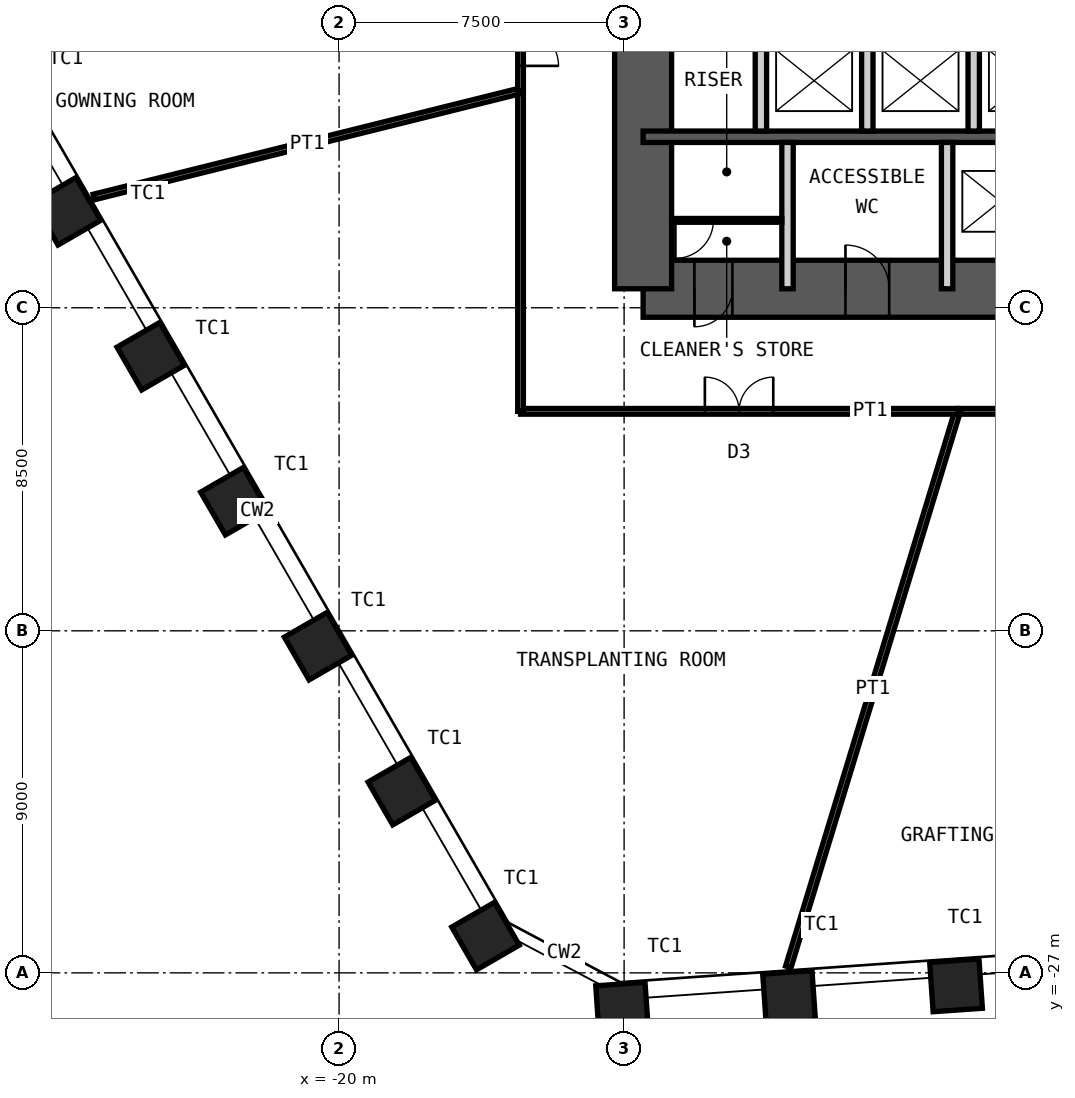
"""IFC4 building model, lengths in metres.
Left out: names, types, materials, properties, quantities, classifications, styles, units other than length and angle.
Written with IfcOpenShell. Run it as: python <this file> out.ifc"""

import sys

from ifc_helpers import new_model, si_unit, direction, frame, frame_2d, origin, origin_2d, place, context, subcontext, project, spatial, rectangle, hollow_rectangle, extrude, element, fill, save


model = new_model("IFC4")
c1 = context("Model", 3, precision=1e-05, world=origin(), true_north=direction((0.0, 1.0)))
c2 = subcontext(c1, "Body", "Model", "MODEL_VIEW")
j1 = project(units=[si_unit("LENGTHUNIT", "METRE"), si_unit("PLANEANGLEUNIT", "RADIAN")], contexts=[c1])
p1 = place(None, origin())
s1 = spatial("IfcSite", under=j1, at=p1, CompositionType="ELEMENT")
p2 = place(p1, origin())
s2 = spatial("IfcBuilding", under=s1, at=p2, CompositionType="ELEMENT")
p3 = place(p2, frame((0.0, 0.0, 32.0)))
s3 = spatial("IfcBuildingStorey", under=s2, at=p3, CompositionType="ELEMENT", Elevation=32.0)
for number, where, z_axis, x_axis in (
    (1, (-3.765, -27.329, 0.0), (0.0, 0.0, 1.0), (0.998, 0.07, 0.0)),
    (2, (-8.159, -27.636, 0.0), (0.0, 0.0, 1.0), (0.998, 0.07, 0.0)),
    (3, (-12.553, -27.944, 0.0), (0.0, 0.0, 1.0), (0.998, 0.07, 0.0)),
    (4, (-16.147, -26.033, 0.0), (0.0, 0.0, 1.0), (0.5, -0.866, 0.0)),
    (5, (-18.349, -22.218, 0.0), (0.0, 0.0, 1.0), (0.5, -0.866, 0.0)),
    (6, (-20.552, -18.404, 0.0), (0.0, 0.0, 1.0), (0.5, -0.866, 0.0)),
    (7, (-22.754, -14.589, 0.0), (0.0, 0.0, 1.0), (0.5, -0.866, 0.0)),
    (8, (-24.956, -10.775, 0.0), (0.0, 0.0, 1.0), (0.5, -0.866, 0.0)),
    (9, (-27.158, -6.96, 0.0), (0.0, 0.0, 1.0), (0.5, -0.866, 0.0)),
):
    element("IfcColumn", number, at=place(p3, frame(where, z_axis=z_axis, x_axis=x_axis)), inside=s3, PredefinedType="COLUMN", context=c2, shape_type="SweptSolid", body=[
        extrude(hollow_rectangle(XDim=1.3, YDim=1.3, WallThickness=0.1, at=origin_2d()), origin(), (0.0, 0.0, 1.0), 5.0),
    ])
p4 = place(p3, frame((-12.0, -9.0, 0.0), z_axis=(0.0, 0.0, 1.0), x_axis=(1.0, 0.0, 0.0)))
e10 = element("IfcWall", 10, at=p4, inside=s3, PredefinedType="SHEAR", context=c2, shape_type="SweptSolid", body=[
    extrude(rectangle(XDim=24.0, YDim=1.5, at=frame_2d((12.0, 0.0))), origin(), (0.0, 0.0, 1.0), 5.0),
])
p5 = place(p4, frame((1.35, 0.0, 0.0)))
e11 = element("IfcOpeningElement", 11, at=p5, cuts=e10, PredefinedType="OPENING", context=c2, shape_type="SweptSolid", body=[
    extrude(rectangle(XDim=1.0, YDim=2.1, at=frame_2d((0.5, 1.05))), frame((0.0, 0.76, 0.0), z_axis=(0.0, -1.0, 0.0), x_axis=(1.0, 0.0, 0.0)), (0.0, 0.0, 1.0), 1.52),
])
p6 = place(p4, frame((5.325, 0.0, 0.0)))
e12 = element("IfcOpeningElement", 12, at=p6, cuts=e10, PredefinedType="OPENING", context=c2, shape_type="SweptSolid", body=[
    extrude(rectangle(XDim=1.15, YDim=2.1, at=frame_2d((0.575, 1.05))), frame((0.0, 0.76, 0.0), z_axis=(0.0, -1.0, 0.0), x_axis=(1.0, 0.0, 0.0)), (0.0, 0.0, 1.0), 1.52),
])
p7 = place(p4, frame((12.6, 0.0, 0.0)))
e13 = element("IfcOpeningElement", 13, at=p7, cuts=e10, PredefinedType="OPENING", context=c2, shape_type="SweptSolid", body=[
    extrude(rectangle(XDim=1.0, YDim=2.1, at=frame_2d((0.5, 1.05))), frame((0.0, 0.76, 0.0), z_axis=(0.0, -1.0, 0.0), x_axis=(1.0, 0.0, 0.0)), (0.0, 0.0, 1.0), 1.52),
])
p8 = place(p3, frame((-12.0, -9.0, 0.0), z_axis=(0.0, 0.0, 1.0), x_axis=(0.0, 1.0, 0.0)))
e14 = element("IfcWall", 14, at=p8, inside=s3, PredefinedType="SHEAR", context=c2, shape_type="SweptSolid", body=[
    extrude(rectangle(XDim=18.0, YDim=1.5, at=frame_2d((9.0, 0.0))), origin(), (0.0, 0.0, 1.0), 5.0),
])
p9 = place(p8, frame((8.1, 0.0, 0.0)))
e15 = element("IfcOpeningElement", 15, at=p9, cuts=e14, PredefinedType="OPENING", context=c2, shape_type="SweptSolid", body=[
    extrude(rectangle(XDim=1.8, YDim=2.1, at=frame_2d((0.9, 1.05))), frame((0.0, 0.76, 0.0), z_axis=(0.0, -1.0, 0.0), x_axis=(1.0, 0.0, 0.0)), (0.0, 0.0, 1.0), 1.52),
])
p10 = place(p3, frame((-12.0, -5.0, 0.0), z_axis=(0.0, 0.0, 1.0), x_axis=(1.0, 0.0, 0.0)))
e16 = element("IfcWall", 16, at=p10, inside=s3, PredefinedType="SHEAR", context=c2, shape_type="SweptSolid", body=[
    extrude(rectangle(XDim=24.0, YDim=0.3, at=frame_2d((12.0, 0.0))), origin(), (0.0, 0.0, 1.0), 5.0),
])
for number, where, z_axis, x_axis in (
    (17, (-8.9, -4.85, 0.0), (0.0, 0.0, 1.0), (0.0, 1.0, 0.0)),
    (18, (-6.1, -4.85, 0.0), (0.0, 0.0, 1.0), (0.0, 1.0, 0.0)),
    (19, (-3.3, -4.85, 0.0), (0.0, 0.0, 1.0), (0.0, 1.0, 0.0)),
):
    element("IfcWall", number, at=place(p3, frame(where, z_axis=z_axis, x_axis=x_axis)), inside=s3, PredefinedType="PARTITIONING", context=c2, shape_type="SweptSolid", body=[
        extrude(rectangle(XDim=2.65, YDim=0.3, at=frame_2d((1.325, 0.0))), origin(), (0.0, 0.0, 1.0), 4.78),
    ])
for number, where, z_axis, x_axis in (
    (20, (-8.2, -9.0, 0.0), (0.0, 0.0, 1.0), (0.0, 1.0, 0.0)),
    (21, (-4.0, -9.0, 0.0), (0.0, 0.0, 1.0), (0.0, 1.0, 0.0)),
):
    element("IfcWall", number, at=place(p3, frame(where, z_axis=z_axis, x_axis=x_axis)), inside=s3, PredefinedType="PARTITIONING", context=c2, shape_type="SweptSolid", body=[
        extrude(rectangle(XDim=3.85, YDim=0.3, at=frame_2d((1.925, 0.0))), origin(), (0.0, 0.0, 1.0), 4.78),
    ])
p11 = place(p3, frame((-11.25, -7.2, 0.0), z_axis=(0.0, 0.0, 1.0), x_axis=(1.0, 0.0, 0.0)))
e22 = element("IfcWall", 22, at=p11, inside=s3, PredefinedType="PARTITIONING", context=c2, shape_type="SweptSolid", body=[
    extrude(rectangle(XDim=2.9, YDim=0.1, at=frame_2d((1.45, 0.0))), origin(), (0.0, 0.0, 1.0), 4.78),
])
p12 = place(p11, frame((0.1, 0.0, 0.0)))
e23 = element("IfcOpeningElement", 23, at=p12, cuts=e22, PredefinedType="OPENING", context=c2, shape_type="SweptSolid", body=[
    extrude(rectangle(XDim=1.0, YDim=2.4, at=frame_2d((0.5, 1.2))), frame((0.0, 0.06, 0.0), z_axis=(0.0, -1.0, 0.0), x_axis=(1.0, 0.0, 0.0)), (0.0, 0.0, 1.0), 0.12),
])
p13 = place(p3, frame((0.269, -12.225, 0.0), z_axis=(0.0, 0.0, 1.0), x_axis=(-1.0, 0.0, 0.0)))
e24 = element("IfcWall", 24, at=p13, inside=s3, PredefinedType="PARTITIONING", context=c2, shape_type="SweptSolid", body=[
    extrude(rectangle(XDim=3.994, YDim=0.15, at=frame_2d((1.997, 0.0))), origin(), (0.0, 0.0, 1.0), 4.8),
])
p14 = place(p13, frame((1.497, 0.0, 0.0)))
e25 = element("IfcOpeningElement", 25, at=p14, cuts=e24, PredefinedType="OPENING", context=c2, shape_type="SweptSolid", body=[
    extrude(rectangle(XDim=1.0, YDim=2.4, at=frame_2d((0.5, 1.2))), frame((0.0, 0.085, 0.0), z_axis=(0.0, -1.0, 0.0), x_axis=(1.0, 0.0, 0.0)), (0.0, 0.0, 1.0), 0.17),
])
p15 = place(p3, frame((-8.179, -26.843, 0.0), z_axis=(0.0, 0.0, 1.0), x_axis=(0.291465492753, 0.956581343397, 0.0)))
e26 = element("IfcWall", 26, at=p15, inside=s3, PredefinedType="PARTITIONING", context=c2, shape_type="SweptSolid", body=[
    extrude(rectangle(XDim=15.281, YDim=0.15, at=frame_2d((7.641, 0.0))), origin(), (0.0, 0.0, 1.0), 3.7),
])
p16 = place(p3, frame((-3.725, -12.225, 0.0), z_axis=(0.0, 0.0, 1.0), x_axis=(-1.0, 0.0, 0.0)))
e27 = element("IfcWall", 27, at=p16, inside=s3, PredefinedType="PARTITIONING", context=c2, shape_type="SweptSolid", body=[
    extrude(rectangle(XDim=11.5, YDim=0.15, at=frame_2d((5.75, 0.0))), origin(), (0.0, 0.0, 1.0), 4.8),
])
p17 = place(p16, frame((4.85, 0.0, 0.0)))
e28 = element("IfcOpeningElement", 28, at=p17, cuts=e27, PredefinedType="OPENING", context=c2, shape_type="SweptSolid", body=[
    extrude(rectangle(XDim=1.8, YDim=2.4, at=frame_2d((0.9, 1.2))), frame((0.0, 0.085, 0.0), z_axis=(0.0, -1.0, 0.0), x_axis=(1.0, 0.0, 0.0)), (0.0, 0.0, 1.0), 0.17),
])
p18 = place(p3, frame((-15.225, -12.225, 0.0), z_axis=(0.0, 0.0, 1.0), x_axis=(0.0, 1.0, 0.0)))
e29 = element("IfcWall", 29, at=p18, inside=s3, PredefinedType="PARTITIONING", context=c2, shape_type="SweptSolid", body=[
    extrude(rectangle(XDim=8.435, YDim=0.15, at=frame_2d((4.217, 0.0))), origin(), (0.0, 0.0, 1.0), 4.8),
])
p19 = place(p3, frame((-26.455, -6.586, 0.0), z_axis=(0.0, 0.0, 1.0), x_axis=(0.970383998101, 0.241567581083, 0.0)))
e30 = element("IfcWall", 30, at=p19, inside=s3, PredefinedType="PARTITIONING", context=c2, shape_type="SweptSolid", body=[
    extrude(rectangle(XDim=11.573, YDim=0.15, at=frame_2d((5.787, 0.0))), origin(), (0.0, 0.0, 1.0), 3.7),
])
p20 = place(p3, frame((-15.225, -3.79, 0.0), z_axis=(0.0, 0.0, 1.0), x_axis=(0.0, 1.0, 0.0)))
e31 = element("IfcWall", 31, at=p20, inside=s3, PredefinedType="PARTITIONING", context=c2, shape_type="SweptSolid", body=[
    extrude(rectangle(XDim=2.31, YDim=0.15, at=frame_2d((1.155, 0.0))), origin(), (0.0, 0.0, 1.0), 4.8),
])
p21 = place(p20, frame((0.655, 0.0, 0.0)))
e32 = element("IfcOpeningElement", 32, at=p21, cuts=e31, PredefinedType="OPENING", context=c2, shape_type="SweptSolid", body=[
    extrude(rectangle(XDim=1.0, YDim=2.4, at=frame_2d((0.5, 1.2))), frame((0.0, 0.085, 0.0), z_axis=(0.0, -1.0, 0.0), x_axis=(1.0, 0.0, 0.0)), (0.0, 0.0, 1.0), 0.17),
])
p22 = place(p3, frame((-28.655, -2.786, 0.0), z_axis=(0.0, 0.0, 1.0), x_axis=(0.995307331187, 0.096764231438, 0.0)))
e33 = element("IfcWall", 33, at=p22, inside=s3, PredefinedType="PARTITIONING", context=c2, shape_type="SweptSolid", body=[
    extrude(rectangle(XDim=13.493, YDim=0.15, at=frame_2d((6.747, 0.0))), origin(), (0.0, 0.0, 1.0), 3.7),
])
p23 = place(p5, origin())
e34 = element("IfcDoor", 34, at=p23, inside=s3, OperationType="SINGLE_SWING_LEFT", PredefinedType="DOOR", context=c2, shape_type="SweptSolid", body=[
    extrude(rectangle(XDim=1.0, YDim=2.1, at=frame_2d((0.5, 1.05))), frame((0.0, 0.025, 0.0), z_axis=(0.0, -1.0, 0.0), x_axis=(1.0, 0.0, 0.0)), (0.0, 0.0, 1.0), 0.05),
])
fill(e11, e34)
p24 = place(p6, origin())
e35 = element("IfcDoor", 35, at=p24, inside=s3, OperationType="SINGLE_SWING_RIGHT", PredefinedType="DOOR", context=c2, shape_type="SweptSolid", body=[
    extrude(rectangle(XDim=1.15, YDim=2.1, at=frame_2d((0.575, 1.05))), frame((0.0, 0.025, 0.0), z_axis=(0.0, -1.0, 0.0), x_axis=(1.0, 0.0, 0.0)), (0.0, 0.0, 1.0), 0.05),
])
fill(e12, e35)
p25 = place(p12, origin())
e36 = element("IfcDoor", 36, at=p25, inside=s3, OperationType="SINGLE_SWING_LEFT", PredefinedType="DOOR", context=c2, shape_type="SweptSolid", body=[
    extrude(rectangle(XDim=1.0, YDim=2.4, at=frame_2d((0.5, 1.2))), frame((0.0, 0.025, 0.0), z_axis=(0.0, -1.0, 0.0), x_axis=(1.0, 0.0, 0.0)), (0.0, 0.0, 1.0), 0.05),
])
fill(e23, e36)
p26 = place(p17, origin())
e37 = element("IfcDoor", 37, at=p26, inside=s3, OperationType="DOUBLE_DOOR_DOUBLE_SWING", PredefinedType="DOOR", context=c2, shape_type="SweptSolid", body=[
    extrude(rectangle(XDim=1.8, YDim=2.4, at=frame_2d((0.9, 1.2))), frame((0.0, 0.025, 0.0), z_axis=(0.0, -1.0, 0.0), x_axis=(1.0, 0.0, 0.0)), (0.0, 0.0, 1.0), 0.05),
])
fill(e28, e37)
p27 = place(p21, origin())
e38 = element("IfcDoor", 38, at=p27, inside=s3, OperationType="SINGLE_SWING_LEFT", PredefinedType="DOOR", context=c2, shape_type="SweptSolid", body=[
    extrude(rectangle(XDim=1.0, YDim=2.4, at=frame_2d((0.5, 1.2))), frame((0.0, 0.025, 0.0), z_axis=(0.0, -1.0, 0.0), x_axis=(1.0, 0.0, 0.0)), (0.0, 0.0, 1.0), 0.05),
])
fill(e32, e38)
save(model, sys.argv[1])
